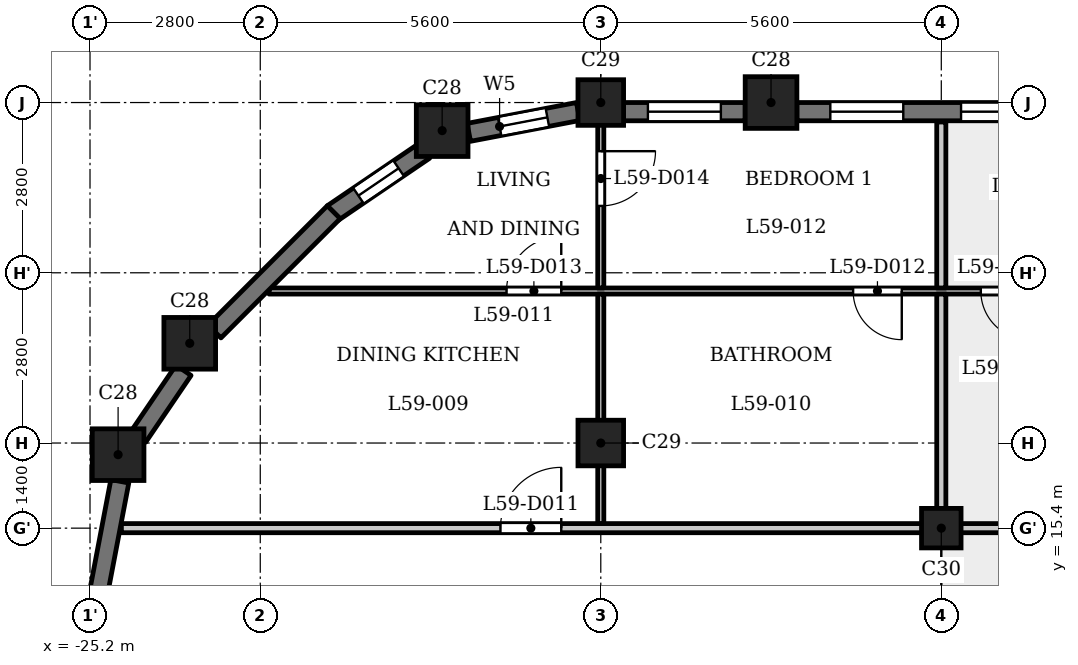
"""IFC4 building model, lengths in metres.
Left out: names, types, materials, properties, quantities, classifications, styles, units other than length and angle.
Written with IfcOpenShell. Run it as: python <this file> out.ifc"""

import sys

from ifc_helpers import new_model, si_unit, direction, frame, frame_2d, origin, origin_2d, place, context, subcontext, project, spatial, rectangle, extrude, element, fill, save


model = new_model("IFC4")
c1 = context("Model", 3, precision=1e-05, world=origin(), true_north=direction((0.0, 1.0)))
c2 = subcontext(c1, "Body", "Model", "MODEL_VIEW")
j1 = project(units=[si_unit("LENGTHUNIT", "METRE"), si_unit("PLANEANGLEUNIT", "RADIAN")], contexts=[c1])
p1 = place(None, origin())
s1 = spatial("IfcSite", under=j1, at=p1, CompositionType="ELEMENT")
p2 = place(p1, origin())
s2 = spatial("IfcBuilding", under=s1, at=p2, CompositionType="ELEMENT")
p3 = place(p2, frame((0.0, 0.0, 227.4)))
s3 = spatial("IfcBuildingStorey", under=s2, at=p3, CompositionType="ELEMENT", Elevation=227.4)
for number, where, z_axis, x_axis in (
    (1, (-14.0, 22.4, 0.0), (0.0, 0.0, 1.0), (1.0, 0.0, 0.0)),
    (2, (-19.409, 21.938, 0.0), (0.0, 0.0, 1.0), (1.0, 0.0, 0.0)),
    (3, (-23.56, 18.44, 0.0), (0.0, 0.0, 1.0), (1.0, 0.0, 0.0)),
    (4, (-24.738, 16.609, 0.0), (0.0, 0.0, 1.0), (1.0, 0.0, 0.0)),
):
    element("IfcColumn", number, at=place(p3, frame(where, z_axis=z_axis, x_axis=x_axis)), inside=s3, PredefinedType="COLUMN", context=c2, shape_type="SweptSolid", body=[
        extrude(rectangle(XDim=0.85, YDim=0.85, at=origin_2d()), origin(), (0.0, 0.0, 1.0), 3.5),
    ])
for number, where, z_axis, x_axis in (
    (5, (-16.8, 16.8, 0.0), (0.0, 0.0, 1.0), (1.0, 0.0, 0.0)),
    (6, (-16.8, 22.4, 0.0), (0.0, 0.0, 1.0), (1.0, 0.0, 0.0)),
):
    element("IfcColumn", number, at=place(p3, frame(where, z_axis=z_axis, x_axis=x_axis)), inside=s3, PredefinedType="COLUMN", context=c2, shape_type="SweptSolid", body=[
        extrude(rectangle(XDim=0.75, YDim=0.75, at=origin_2d()), origin(), (0.0, 0.0, 1.0), 3.5),
    ])
p4 = place(p3, frame((-11.2, 15.4, 0.0), z_axis=(0.0, 0.0, 1.0), x_axis=(1.0, 0.0, 0.0)))
e7 = element("IfcColumn", 7, at=p4, inside=s3, PredefinedType="COLUMN", context=c2, shape_type="SweptSolid", body=[
    extrude(rectangle(XDim=0.65, YDim=0.65, at=origin_2d()), origin(), (0.0, 0.0, 1.0), 3.5),
])
p5 = place(p3, frame((-8.825, 22.25, 0.0), z_axis=(0.0, 0.0, 1.0), x_axis=(-1.0, 0.0, 0.0)))
e8 = element("IfcWall", 8, at=p5, inside=s3, PredefinedType="SOLIDWALL", context=c2, shape_type="SweptSolid", body=[
    extrude(rectangle(XDim=4.75, YDim=0.3, at=frame_2d((2.375, 0.0))), origin(), (0.0, 0.0, 1.0), 2.45),
])
p6 = place(p5, frame((0.25, 0.0, 0.9)))
e9 = element("IfcOpeningElement", 9, at=p6, cuts=e8, PredefinedType="OPENING", context=c2, shape_type="SweptSolid", body=[
    extrude(rectangle(XDim=1.8, YDim=1.25, at=frame_2d((0.9, 0.625))), frame((0.0, 0.16, 0.0), z_axis=(0.0, -1.0, 0.0), x_axis=(1.0, 0.0, 0.0)), (0.0, 0.0, 1.0), 0.32),
])
p7 = place(p5, frame((3.0, 0.0, 0.6)))
e10 = element("IfcOpeningElement", 10, at=p7, cuts=e8, PredefinedType="OPENING", context=c2, shape_type="SweptSolid", body=[
    extrude(rectangle(XDim=1.2, YDim=1.55, at=frame_2d((0.6, 0.775))), frame((0.0, 0.16, 0.0), z_axis=(0.0, -1.0, 0.0), x_axis=(1.0, 0.0, 0.0)), (0.0, 0.0, 1.0), 0.32),
])
p8 = place(p3, frame((-14.425, 22.25, 0.0), z_axis=(0.0, 0.0, 1.0), x_axis=(-1.0, 0.0, 0.0)))
e11 = element("IfcWall", 11, at=p8, inside=s3, PredefinedType="SOLIDWALL", context=c2, shape_type="SweptSolid", body=[
    extrude(rectangle(XDim=2.0, YDim=0.3, at=frame_2d((1.0, 0.0))), origin(), (0.0, 0.0, 1.0), 2.45),
])
p9 = place(p8, frame((0.4, 0.0, 0.6)))
e12 = element("IfcOpeningElement", 12, at=p9, cuts=e11, PredefinedType="OPENING", context=c2, shape_type="SweptSolid", body=[
    extrude(rectangle(XDim=1.2, YDim=1.55, at=frame_2d((0.6, 0.775))), frame((0.0, 0.16, 0.0), z_axis=(0.0, -1.0, 0.0), x_axis=(1.0, 0.0, 0.0)), (0.0, 0.0, 1.0), 0.32),
])
p10 = place(p3, frame((-17.172, 22.253, 0.0), z_axis=(0.0, 0.0, 1.0), x_axis=(-0.982300037503, -0.187314271538, 0.0)))
e13 = element("IfcWall", 13, at=p10, inside=s3, PredefinedType="SOLIDWALL", context=c2, shape_type="SweptSolid", body=[
    extrude(rectangle(XDim=1.831, YDim=0.3, at=frame_2d((0.916, 0.0))), origin(), (0.0, 0.0, 1.0), 2.45),
])
p11 = place(p10, frame((0.516, 0.0, 0.6)))
e14 = element("IfcOpeningElement", 14, at=p11, cuts=e13, PredefinedType="OPENING", context=c2, shape_type="SweptSolid", body=[
    extrude(rectangle(XDim=0.8, YDim=1.55, at=frame_2d((0.4, 0.775))), frame((0.0, 0.16, 0.0), z_axis=(0.0, -1.0, 0.0), x_axis=(1.0, 0.0, 0.0)), (0.0, 0.0, 1.0), 0.32),
])
p12 = place(p3, frame((-19.698, 21.608, 0.0), z_axis=(0.0, 0.0, 1.0), x_axis=(-0.82705295608, -0.562124014644, 0.0)))
e15 = element("IfcWall", 15, at=p12, inside=s3, PredefinedType="SOLIDWALL", context=c2, shape_type="SweptSolid", body=[
    extrude(rectangle(XDim=1.831, YDim=0.3, at=frame_2d((0.916, 0.0))), origin(), (0.0, 0.0, 1.0), 2.45),
])
p13 = place(p12, frame((0.516, 0.0, 0.6)))
e16 = element("IfcOpeningElement", 16, at=p13, cuts=e15, PredefinedType="OPENING", context=c2, shape_type="SweptSolid", body=[
    extrude(rectangle(XDim=0.8, YDim=1.55, at=frame_2d((0.4, 0.775))), frame((0.0, 0.16, 0.0), z_axis=(0.0, -1.0, 0.0), x_axis=(1.0, 0.0, 0.0)), (0.0, 0.0, 1.0), 0.32),
])
p14 = place(p3, frame((-21.191, 20.597, 0.0), z_axis=(0.0, 0.0, 1.0), x_axis=(-0.707150767798, -0.707062791838, 0.0)))
e17 = element("IfcWall", 17, at=p14, inside=s3, PredefinedType="SOLIDWALL", context=c2, shape_type="SweptSolid", body=[
    extrude(rectangle(XDim=2.775, YDim=0.3, at=frame_2d((1.388, 0.0))), origin(), (0.0, 0.0, 1.0), 2.45),
])
p15 = place(p3, frame((-23.662, 17.996, 0.0), z_axis=(0.0, 0.0, 1.0), x_axis=(-0.562149004813, -0.827035970432, 0.0)))
e18 = element("IfcWall", 18, at=p15, inside=s3, PredefinedType="SOLIDWALL", context=c2, shape_type="SweptSolid", body=[
    extrude(rectangle(XDim=1.327, YDim=0.3, at=frame_2d((0.664, 0.0))), origin(), (0.0, 0.0, 1.0), 2.45),
])
p16 = place(p3, frame((-24.709, 16.171, 0.0), z_axis=(0.0, 0.0, 1.0), x_axis=(-0.187442908742, -0.982275499014, 0.0)))
e19 = element("IfcWall", 19, at=p16, inside=s3, PredefinedType="SOLIDWALL", context=c2, shape_type="SweptSolid", body=[
    extrude(rectangle(XDim=1.831, YDim=0.3, at=frame_2d((0.916, 0.0))), origin(), (0.0, 0.0, 1.0), 2.45),
])
p17 = place(p3, frame((-24.684, 15.4, 0.0), z_axis=(0.0, 0.0, 1.0), x_axis=(1.0, 0.0, 0.0)))
e20 = element("IfcWall", 20, at=p17, inside=s3, PredefinedType="PARTITIONING", context=c2, shape_type="SweptSolid", body=[
    extrude(rectangle(XDim=49.368, YDim=0.15, at=frame_2d((24.684, 0.0))), origin(), (0.0, 0.0, 1.0), 3.15),
])
p18 = place(p17, frame((6.234, 0.0, 0.0)))
e21 = element("IfcOpeningElement", 21, at=p18, cuts=e20, PredefinedType="OPENING", context=c2, shape_type="SweptSolid", body=[
    extrude(rectangle(XDim=1.0, YDim=2.1, at=frame_2d((0.5, 1.05))), frame((0.0, 0.085, 0.0), z_axis=(0.0, -1.0, 0.0), x_axis=(1.0, 0.0, 0.0)), (0.0, 0.0, 1.0), 0.17),
])
p19 = place(p17, frame((17.434, 0.0, 0.0)))
e22 = element("IfcOpeningElement", 22, at=p19, cuts=e20, PredefinedType="OPENING", context=c2, shape_type="SweptSolid", body=[
    extrude(rectangle(XDim=1.0, YDim=2.1, at=frame_2d((0.5, 1.05))), frame((0.0, 0.085, 0.0), z_axis=(0.0, -1.0, 0.0), x_axis=(1.0, 0.0, 0.0)), (0.0, 0.0, 1.0), 0.17),
])
p20 = place(p17, frame((25.384, 0.0, 0.0)))
e23 = element("IfcOpeningElement", 23, at=p20, cuts=e20, PredefinedType="OPENING", context=c2, shape_type="SweptSolid", body=[
    extrude(rectangle(XDim=1.0, YDim=2.1, at=frame_2d((0.5, 1.05))), frame((0.0, 0.085, 0.0), z_axis=(0.0, -1.0, 0.0), x_axis=(1.0, 0.0, 0.0)), (0.0, 0.0, 1.0), 0.17),
])
p21 = place(p17, frame((33.484, 0.0, 0.0)))
e24 = element("IfcOpeningElement", 24, at=p21, cuts=e20, PredefinedType="OPENING", context=c2, shape_type="SweptSolid", body=[
    extrude(rectangle(XDim=1.0, YDim=2.1, at=frame_2d((0.5, 1.05))), frame((0.0, 0.085, 0.0), z_axis=(0.0, -1.0, 0.0), x_axis=(1.0, 0.0, 0.0)), (0.0, 0.0, 1.0), 0.17),
])
p22 = place(p17, frame((47.225, 0.0, 0.0)))
e25 = element("IfcOpeningElement", 25, at=p22, cuts=e20, PredefinedType="OPENING", context=c2, shape_type="SweptSolid", body=[
    extrude(rectangle(XDim=1.0, YDim=2.1, at=frame_2d((0.5, 1.05))), frame((0.0, 0.085, 0.0), z_axis=(0.0, -1.0, 0.0), x_axis=(1.0, 0.0, 0.0)), (0.0, 0.0, 1.0), 0.17),
])
p23 = place(p3, frame((-22.256, 19.3, 0.0), z_axis=(0.0, 0.0, 1.0), x_axis=(1.0, 0.0, 0.0)))
e26 = element("IfcWall", 26, at=p23, inside=s3, PredefinedType="PARTITIONING", context=c2, shape_type="SweptSolid", body=[
    extrude(rectangle(XDim=44.511, YDim=0.1, at=frame_2d((22.256, 0.0))), origin(), (0.0, 0.0, 1.0), 3.15),
])
p24 = place(p23, frame((9.606, 0.0, 0.0)))
e27 = element("IfcOpeningElement", 27, at=p24, cuts=e26, PredefinedType="OPENING", context=c2, shape_type="SweptSolid", body=[
    extrude(rectangle(XDim=0.8, YDim=2.1, at=frame_2d((0.4, 1.05))), frame((0.0, 0.06, 0.0), z_axis=(0.0, -1.0, 0.0), x_axis=(1.0, 0.0, 0.0)), (0.0, 0.0, 1.0), 0.12),
])
p25 = place(p23, frame((3.906, 0.0, 0.0)))
e28 = element("IfcOpeningElement", 28, at=p25, cuts=e26, PredefinedType="OPENING", context=c2, shape_type="SweptSolid", body=[
    extrude(rectangle(XDim=0.9, YDim=2.1, at=frame_2d((0.45, 1.05))), frame((0.0, 0.06, 0.0), z_axis=(0.0, -1.0, 0.0), x_axis=(1.0, 0.0, 0.0)), (0.0, 0.0, 1.0), 0.12),
])
p26 = place(p23, frame((11.706, 0.0, 0.0)))
e29 = element("IfcOpeningElement", 29, at=p26, cuts=e26, PredefinedType="OPENING", context=c2, shape_type="SweptSolid", body=[
    extrude(rectangle(XDim=0.8, YDim=2.1, at=frame_2d((0.4, 1.05))), frame((0.0, 0.06, 0.0), z_axis=(0.0, -1.0, 0.0), x_axis=(1.0, 0.0, 0.0)), (0.0, 0.0, 1.0), 0.12),
])
p27 = place(p23, frame((15.106, 0.0, 0.0)))
e30 = element("IfcOpeningElement", 30, at=p27, cuts=e26, PredefinedType="OPENING", context=c2, shape_type="SweptSolid", body=[
    extrude(rectangle(XDim=0.9, YDim=2.1, at=frame_2d((0.45, 1.05))), frame((0.0, 0.06, 0.0), z_axis=(0.0, -1.0, 0.0), x_axis=(1.0, 0.0, 0.0)), (0.0, 0.0, 1.0), 0.12),
])
p28 = place(p23, frame((17.556, 0.0, 0.0)))
e31 = element("IfcOpeningElement", 31, at=p28, cuts=e26, PredefinedType="OPENING", context=c2, shape_type="SweptSolid", body=[
    extrude(rectangle(XDim=0.8, YDim=2.1, at=frame_2d((0.4, 1.05))), frame((0.0, 0.06, 0.0), z_axis=(0.0, -1.0, 0.0), x_axis=(1.0, 0.0, 0.0)), (0.0, 0.0, 1.0), 0.12),
])
p29 = place(p23, frame((19.956, 0.0, 0.0)))
e32 = element("IfcOpeningElement", 32, at=p29, cuts=e26, PredefinedType="OPENING", context=c2, shape_type="SweptSolid", body=[
    extrude(rectangle(XDim=0.9, YDim=2.1, at=frame_2d((0.45, 1.05))), frame((0.0, 0.06, 0.0), z_axis=(0.0, -1.0, 0.0), x_axis=(1.0, 0.0, 0.0)), (0.0, 0.0, 1.0), 0.12),
])
p30 = place(p23, frame((23.456, 0.0, 0.0)))
e33 = element("IfcOpeningElement", 33, at=p30, cuts=e26, PredefinedType="OPENING", context=c2, shape_type="SweptSolid", body=[
    extrude(rectangle(XDim=0.9, YDim=2.1, at=frame_2d((0.45, 1.05))), frame((0.0, 0.06, 0.0), z_axis=(0.0, -1.0, 0.0), x_axis=(1.0, 0.0, 0.0)), (0.0, 0.0, 1.0), 0.12),
])
p31 = place(p23, frame((26.056, 0.0, 0.0)))
e34 = element("IfcOpeningElement", 34, at=p31, cuts=e26, PredefinedType="OPENING", context=c2, shape_type="SweptSolid", body=[
    extrude(rectangle(XDim=0.9, YDim=2.1, at=frame_2d((0.45, 1.05))), frame((0.0, 0.06, 0.0), z_axis=(0.0, -1.0, 0.0), x_axis=(1.0, 0.0, 0.0)), (0.0, 0.0, 1.0), 0.12),
])
p32 = place(p23, frame((28.756, 0.0, 0.0)))
e35 = element("IfcOpeningElement", 35, at=p32, cuts=e26, PredefinedType="OPENING", context=c2, shape_type="SweptSolid", body=[
    extrude(rectangle(XDim=0.8, YDim=2.1, at=frame_2d((0.4, 1.05))), frame((0.0, 0.06, 0.0), z_axis=(0.0, -1.0, 0.0), x_axis=(1.0, 0.0, 0.0)), (0.0, 0.0, 1.0), 0.12),
])
p33 = place(p23, frame((31.156, 0.0, 0.0)))
e36 = element("IfcOpeningElement", 36, at=p33, cuts=e26, PredefinedType="OPENING", context=c2, shape_type="SweptSolid", body=[
    extrude(rectangle(XDim=0.9, YDim=2.1, at=frame_2d((0.45, 1.05))), frame((0.0, 0.06, 0.0), z_axis=(0.0, -1.0, 0.0), x_axis=(1.0, 0.0, 0.0)), (0.0, 0.0, 1.0), 0.12),
])
p34 = place(p23, frame((37.606, 0.0, 0.0)))
e37 = element("IfcOpeningElement", 37, at=p34, cuts=e26, PredefinedType="OPENING", context=c2, shape_type="SweptSolid", body=[
    extrude(rectangle(XDim=0.8, YDim=2.1, at=frame_2d((0.4, 1.05))), frame((0.0, 0.06, 0.0), z_axis=(0.0, -1.0, 0.0), x_axis=(1.0, 0.0, 0.0)), (0.0, 0.0, 1.0), 0.12),
])
p35 = place(p23, frame((42.028, 0.0, 0.0)))
e38 = element("IfcOpeningElement", 38, at=p35, cuts=e26, PredefinedType="OPENING", context=c2, shape_type="SweptSolid", body=[
    extrude(rectangle(XDim=0.9, YDim=2.1, at=frame_2d((0.45, 1.05))), frame((0.0, 0.06, 0.0), z_axis=(0.0, -1.0, 0.0), x_axis=(1.0, 0.0, 0.0)), (0.0, 0.0, 1.0), 0.12),
])
p36 = place(p3, frame((-16.8, 15.475, 0.0), z_axis=(0.0, 0.0, 1.0), x_axis=(0.0, 1.0, 0.0)))
e39 = element("IfcWall", 39, at=p36, inside=s3, PredefinedType="PARTITIONING", context=c2, shape_type="SweptSolid", body=[
    extrude(rectangle(XDim=3.775, YDim=0.1, at=frame_2d((1.887, 0.0))), origin(), (0.0, 0.0, 1.0), 2.5),
])
p37 = place(p3, frame((-16.8, 19.35, 0.0), z_axis=(0.0, 0.0, 1.0), x_axis=(0.0, 1.0, 0.0)))
e40 = element("IfcWall", 40, at=p37, inside=s3, PredefinedType="PARTITIONING", context=c2, shape_type="SweptSolid", body=[
    extrude(rectangle(XDim=2.96, YDim=0.1, at=frame_2d((1.48, 0.0))), origin(), (0.0, 0.0, 1.0), 2.5),
])
p38 = place(p37, frame((1.35, 0.0, 0.0)))
e41 = element("IfcOpeningElement", 41, at=p38, cuts=e40, PredefinedType="OPENING", context=c2, shape_type="SweptSolid", body=[
    extrude(rectangle(XDim=0.9, YDim=2.1, at=frame_2d((0.45, 1.05))), frame((0.0, 0.06, 0.0), z_axis=(0.0, -1.0, 0.0), x_axis=(1.0, 0.0, 0.0)), (0.0, 0.0, 1.0), 0.12),
])
p39 = place(p3, frame((-11.2, 15.475, 0.0), z_axis=(0.0, 0.0, 1.0), x_axis=(0.0, 1.0, 0.0)))
e42 = element("IfcWall", 42, at=p39, inside=s3, PredefinedType="PARTITIONING", context=c2, shape_type="SweptSolid", body=[
    extrude(rectangle(XDim=3.775, YDim=0.15, at=frame_2d((1.887, 0.0))), origin(), (0.0, 0.0, 1.0), 3.15),
])
p40 = place(p3, frame((-11.2, 19.35, 0.0), z_axis=(0.0, 0.0, 1.0), x_axis=(0.0, 1.0, 0.0)))
e43 = element("IfcWall", 43, at=p40, inside=s3, PredefinedType="PARTITIONING", context=c2, shape_type="SweptSolid", body=[
    extrude(rectangle(XDim=2.73, YDim=0.15, at=frame_2d((1.365, 0.0))), origin(), (0.0, 0.0, 1.0), 3.15),
])
p41 = place(p18, origin())
e44 = element("IfcDoor", 44, at=p41, inside=s3, OperationType="SINGLE_SWING_LEFT", PredefinedType="DOOR", context=c2, shape_type="SweptSolid", body=[
    extrude(rectangle(XDim=1.0, YDim=2.1, at=frame_2d((0.5, 1.05))), frame((0.0, 0.025, 0.0), z_axis=(0.0, -1.0, 0.0), x_axis=(1.0, 0.0, 0.0)), (0.0, 0.0, 1.0), 0.05),
])
fill(e21, e44)
p42 = place(p24, origin())
e45 = element("IfcDoor", 45, at=p42, inside=s3, OperationType="SINGLE_SWING_RIGHT", PredefinedType="DOOR", context=c2, shape_type="SweptSolid", body=[
    extrude(rectangle(XDim=0.8, YDim=2.1, at=frame_2d((0.4, 1.05))), frame((0.0, 0.025, 0.0), z_axis=(0.0, -1.0, 0.0), x_axis=(1.0, 0.0, 0.0)), (0.0, 0.0, 1.0), 0.05),
])
fill(e27, e45)
p43 = place(p25, origin())
e46 = element("IfcDoor", 46, at=p43, inside=s3, OperationType="SINGLE_SWING_LEFT", PredefinedType="DOOR", context=c2, shape_type="SweptSolid", body=[
    extrude(rectangle(XDim=0.9, YDim=2.1, at=frame_2d((0.45, 1.05))), frame((0.0, 0.025, 0.0), z_axis=(0.0, -1.0, 0.0), x_axis=(1.0, 0.0, 0.0)), (0.0, 0.0, 1.0), 0.05),
])
fill(e28, e46)
p44 = place(p38, origin())
e47 = element("IfcDoor", 47, at=p44, inside=s3, OperationType="SINGLE_SWING_RIGHT", PredefinedType="DOOR", context=c2, shape_type="SweptSolid", body=[
    extrude(rectangle(XDim=0.9, YDim=2.1, at=frame_2d((0.45, 1.05))), frame((0.0, 0.025, 0.0), z_axis=(0.0, -1.0, 0.0), x_axis=(1.0, 0.0, 0.0)), (0.0, 0.0, 1.0), 0.05),
])
fill(e41, e47)
p45 = place(p26, origin())
e48 = element("IfcDoor", 48, at=p45, inside=s3, OperationType="SINGLE_SWING_RIGHT", PredefinedType="DOOR", context=c2, shape_type="SweptSolid", body=[
    extrude(rectangle(XDim=0.8, YDim=2.1, at=frame_2d((0.4, 1.05))), frame((0.0, 0.025, 0.0), z_axis=(0.0, -1.0, 0.0), x_axis=(1.0, 0.0, 0.0)), (0.0, 0.0, 1.0), 0.05),
])
fill(e29, e48)
p46 = place(p6, origin())
e49 = element("IfcWindow", 49, at=p46, inside=s3, PartitioningType="SINGLE_PANEL", PredefinedType="WINDOW", context=c2, shape_type="SweptSolid", body=[
    extrude(rectangle(XDim=1.8, YDim=1.25, at=frame_2d((0.9, 0.625))), frame((0.0, 0.03, 0.0), z_axis=(0.0, -1.0, 0.0), x_axis=(1.0, 0.0, 0.0)), (0.0, 0.0, 1.0), 0.06),
])
fill(e9, e49)
p47 = place(p7, origin())
e50 = element("IfcWindow", 50, at=p47, inside=s3, PartitioningType="SINGLE_PANEL", PredefinedType="WINDOW", context=c2, shape_type="SweptSolid", body=[
    extrude(rectangle(XDim=1.2, YDim=1.55, at=frame_2d((0.6, 0.775))), frame((0.0, 0.03, 0.0), z_axis=(0.0, -1.0, 0.0), x_axis=(1.0, 0.0, 0.0)), (0.0, 0.0, 1.0), 0.06),
])
fill(e10, e50)
p48 = place(p9, origin())
e51 = element("IfcWindow", 51, at=p48, inside=s3, PartitioningType="SINGLE_PANEL", PredefinedType="WINDOW", context=c2, shape_type="SweptSolid", body=[
    extrude(rectangle(XDim=1.2, YDim=1.55, at=frame_2d((0.6, 0.775))), frame((0.0, 0.03, 0.0), z_axis=(0.0, -1.0, 0.0), x_axis=(1.0, 0.0, 0.0)), (0.0, 0.0, 1.0), 0.06),
])
fill(e12, e51)
p49 = place(p11, origin())
e52 = element("IfcWindow", 52, at=p49, inside=s3, PartitioningType="SINGLE_PANEL", PredefinedType="WINDOW", context=c2, shape_type="SweptSolid", body=[
    extrude(rectangle(XDim=0.8, YDim=1.55, at=frame_2d((0.4, 0.775))), frame((0.0, 0.03, 0.0), z_axis=(0.0, -1.0, 0.0), x_axis=(1.0, 0.0, 0.0)), (0.0, 0.0, 1.0), 0.06),
])
fill(e14, e52)
p50 = place(p13, origin())
e53 = element("IfcWindow", 53, at=p50, inside=s3, PartitioningType="SINGLE_PANEL", PredefinedType="WINDOW", context=c2, shape_type="SweptSolid", body=[
    extrude(rectangle(XDim=0.8, YDim=1.55, at=frame_2d((0.4, 0.775))), frame((0.0, 0.03, 0.0), z_axis=(0.0, -1.0, 0.0), x_axis=(1.0, 0.0, 0.0)), (0.0, 0.0, 1.0), 0.06),
])
fill(e16, e53)
save(model, sys.argv[1])
